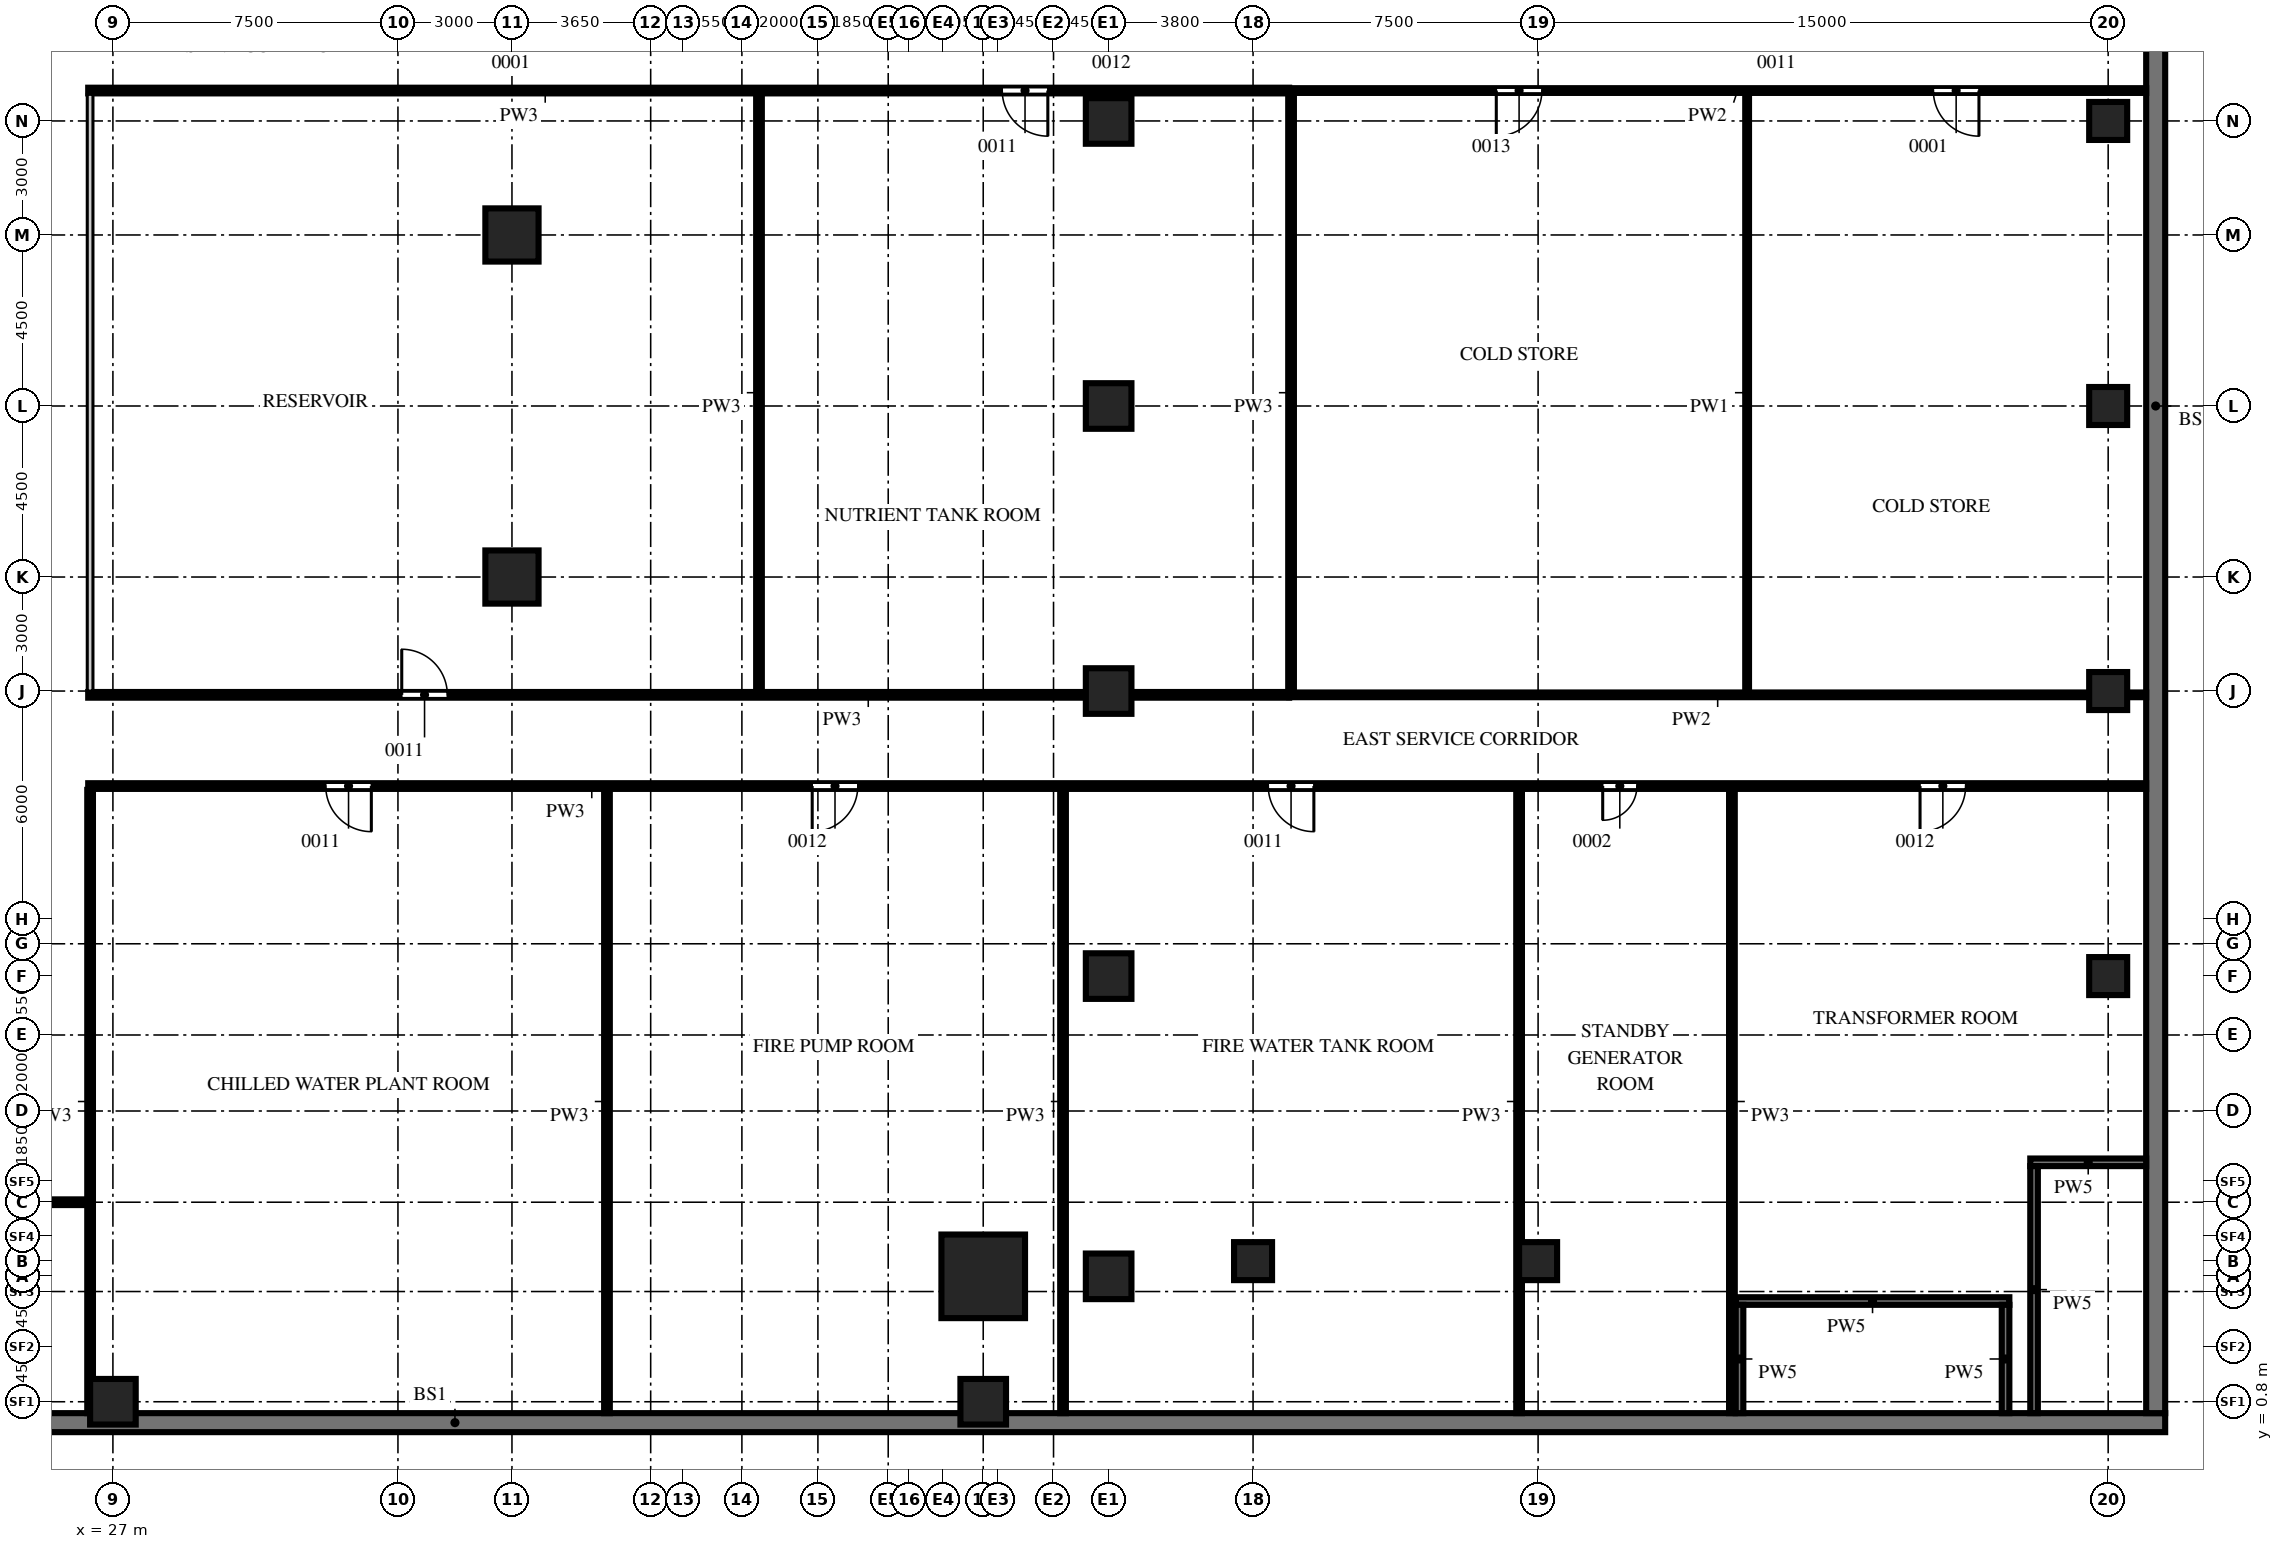
"""IFC4 building model, lengths in metres.
Left out: names, types, materials, properties, quantities, classifications, styles, units other than length and angle.
Written with IfcOpenShell. Run it as: python <this file> out.ifc"""

import sys

from ifc_helpers import new_model, si_unit, direction, frame, frame_2d, origin, origin_2d, place, context, subcontext, project, spatial, rectangle, extrude, source, transform, mapped, element, fill, save


model = new_model("IFC4")
c1 = context("Model", 3, precision=1e-05, world=origin(), true_north=direction((0.0, 1.0)))
c2 = subcontext(c1, "Body", "Model", "MODEL_VIEW")
j1 = project(units=[si_unit("LENGTHUNIT", "METRE"), si_unit("PLANEANGLEUNIT", "RADIAN")], contexts=[c1])
p1 = place(None, origin())
s1 = spatial("IfcSite", under=j1, at=p1, CompositionType="ELEMENT")
p2 = place(p1, origin())
s2 = spatial("IfcBuilding", under=s1, at=p2, CompositionType="ELEMENT")
p3 = place(p2, frame((0.0, 0.0, -9.0)))
s3 = spatial("IfcBuildingStorey", under=s2, at=p3, CompositionType="ELEMENT", Elevation=-9.0)
m1 = source(origin(), c2, "Body", "SweptSolid", [
    extrude(rectangle(XDim=90.0, YDim=0.5, at=frame_2d((45.0, 0.0))), origin(), (0.0, 0.0, 1.0), 4.2),
])
p4 = place(p3, frame((-9.0, 0.25, 0.0), z_axis=(0.0, 0.0, 1.0), x_axis=(1.0, 0.0, 0.0)))
e1 = element("IfcWall", 1, at=p4, inside=s3, PredefinedType="STANDARD", context=c2, shape_type="MappedRepresentation", body=[
    mapped(m1, transform((0.0, 0.0, 0.0))),
])
m2 = source(origin(), c2, "Body", "SweptSolid", [
    extrude(rectangle(XDim=53.0, YDim=0.5, at=frame_2d((26.5, 0.0))), origin(), (0.0, 0.0, 1.0), 4.2),
])
p5 = place(p3, frame((80.75, 0.5, 0.0), z_axis=(0.0, 0.0, 1.0), x_axis=(0.0, 1.0, 0.0)))
e2 = element("IfcWall", 2, at=p5, inside=s3, PredefinedType="STANDARD", context=c2, shape_type="MappedRepresentation", body=[
    mapped(m2, transform((0.0, 0.0, 0.0))),
])
m3 = source(origin(), c2, "Body", "SweptSolid", [
    extrude(rectangle(XDim=2.2, YDim=2.2, at=origin_2d()), origin(), (0.0, 0.0, 1.0), 4.5),
])
p6 = place(p3, frame((49.9, 4.1, 0.0), z_axis=(0.0, 0.0, 1.0), x_axis=(1.0, 0.0, 0.0)))
e3 = element("IfcColumn", 3, at=p6, inside=s3, PredefinedType="COLUMN", context=c2, shape_type="MappedRepresentation", body=[
    mapped(m3, transform((0.0, 0.0, 0.0))),
])
m4 = source(origin(), c2, "Body", "SweptSolid", [
    extrude(rectangle(XDim=1.2, YDim=1.2, at=origin_2d()), origin(), (0.0, 0.0, 1.0), 4.2),
])
for number, where, z_axis, x_axis in (
    (4, (27.0, 0.8, 0.0), (0.0, 0.0, 1.0), (1.0, 0.0, 0.0)),
    (5, (49.9, 0.8, 0.0), (0.0, 0.0, 1.0), (1.0, 0.0, 0.0)),
    (6, (53.2, 4.1, 0.0), (0.0, 0.0, 1.0), (1.0, 0.0, 0.0)),
    (7, (53.2, 12.0, 0.0), (0.0, 0.0, 1.0), (1.0, 0.0, 0.0)),
    (8, (53.2, 19.5, 0.0), (0.0, 0.0, 1.0), (1.0, 0.0, 0.0)),
    (9, (53.2, 27.0, 0.0), (0.0, 0.0, 1.0), (1.0, 0.0, 0.0)),
    (10, (53.2, 34.5, 0.0), (0.0, 0.0, 1.0), (1.0, 0.0, 0.0)),
):
    element("IfcColumn", number, at=place(p3, frame(where, z_axis=z_axis, x_axis=x_axis)), inside=s3, PredefinedType="COLUMN", context=c2, shape_type="MappedRepresentation", body=[
        mapped(m4, transform((0.0, 0.0, 0.0))),
    ])
m5 = source(origin(), c2, "Body", "SweptSolid", [
    extrude(rectangle(XDim=1.4, YDim=1.4, at=origin_2d()), origin(), (0.0, 0.0, 1.0), 4.2),
])
for number, where, z_axis, x_axis in (
    (11, (37.5, 22.5, 0.0), (0.0, 0.0, 1.0), (1.0, 0.0, 0.0)),
    (12, (37.5, 31.5, 0.0), (0.0, 0.0, 1.0), (1.0, 0.0, 0.0)),
):
    element("IfcColumn", number, at=place(p3, frame(where, z_axis=z_axis, x_axis=x_axis)), inside=s3, PredefinedType="COLUMN", context=c2, shape_type="MappedRepresentation", body=[
        mapped(m5, transform((0.0, 0.0, 0.0))),
    ])
m6 = source(origin(), c2, "Body", "SweptSolid", [
    extrude(rectangle(XDim=1.0, YDim=1.0, at=origin_2d()), origin(), (0.0, 0.0, 1.0), 4.2),
])
for number, where, z_axis, x_axis in (
    (13, (57.0, 4.5, 0.0), (0.0, 0.0, 1.0), (1.0, 0.0, 0.0)),
    (14, (64.5, 4.5, 0.0), (0.0, 0.0, 1.0), (1.0, 0.0, 0.0)),
    (15, (79.5, 12.0, 0.0), (0.0, 0.0, 1.0), (1.0, 0.0, 0.0)),
    (16, (79.5, 19.5, 0.0), (0.0, 0.0, 1.0), (1.0, 0.0, 0.0)),
    (17, (79.5, 27.0, 0.0), (0.0, 0.0, 1.0), (1.0, 0.0, 0.0)),
    (18, (79.5, 34.5, 0.0), (0.0, 0.0, 1.0), (1.0, 0.0, 0.0)),
):
    element("IfcColumn", number, at=place(p3, frame(where, z_axis=z_axis, x_axis=x_axis)), inside=s3, PredefinedType="COLUMN", context=c2, shape_type="MappedRepresentation", body=[
        mapped(m6, transform((0.0, 0.0, 0.0))),
    ])
m7 = source(origin(), c2, "Body", "SweptSolid", [
    extrude(rectangle(XDim=16.4, YDim=0.15, at=frame_2d((8.2, 0.0))), origin(), (0.0, 0.0, 1.0), 4.2),
])
for number, where, z_axis, x_axis in (
    (19, (26.4, 0.5, 0.0), (0.0, 0.0, 1.0), (0.0, 1.0, 0.0)),
    (20, (40.0, 0.5, 0.0), (0.0, 0.0, 1.0), (0.0, 1.0, 0.0)),
    (21, (52.0, 0.5, 0.0), (0.0, 0.0, 1.0), (0.0, 1.0, 0.0)),
    (22, (64.0, 0.5, 0.0), (0.0, 0.0, 1.0), (0.0, 1.0, 0.0)),
    (23, (69.6, 0.5, 0.0), (0.0, 0.0, 1.0), (0.0, 1.0, 0.0)),
):
    element("IfcWall", number, at=place(p3, frame(where, z_axis=z_axis, x_axis=x_axis)), inside=s3, PredefinedType="PARTITIONING", context=c2, shape_type="MappedRepresentation", body=[
        mapped(m7, transform((0.0, 0.0, 0.0))),
    ])
m8 = source(origin(), c2, "Body", "SweptSolid", [
    extrude(rectangle(XDim=22.0, YDim=0.15, at=frame_2d((11.0, 0.0))), origin(), (0.0, 0.0, 1.0), 4.2),
])
p7 = place(p3, frame((4.3, 6.05, 0.0), z_axis=(0.0, 0.0, 1.0), x_axis=(1.0, 0.0, 0.0)))
e24 = element("IfcWall", 24, at=p7, inside=s3, PredefinedType="PARTITIONING", context=c2, shape_type="MappedRepresentation", body=[
    mapped(m8, transform((0.0, 0.0, 0.0))),
])
m9 = source(origin(), c2, "Body", "SweptSolid", [
    extrude(rectangle(XDim=1.2, YDim=2.1, at=frame_2d((0.6, 1.05))), frame((0.0, 0.085, 0.0), z_axis=(0.0, -1.0, 0.0), x_axis=(1.0, 0.0, 0.0)), (0.0, 0.0, 1.0), 0.17),
])
p8 = place(p7, frame((9.05, 0.0, 0.0)))
e25 = element("IfcOpeningElement", 25, at=p8, cuts=e24, PredefinedType="OPENING", context=c2, shape_type="MappedRepresentation", body=[
    mapped(m9, transform((0.0, 0.0, 0.0))),
])
m10 = source(origin(), c2, "Body", "SweptSolid", [
    extrude(rectangle(XDim=54.15, YDim=0.15, at=frame_2d((27.075, 0.0))), origin(), (0.0, 0.0, 1.0), 4.2),
])
p9 = place(p3, frame((26.35, 17.0, 0.0), z_axis=(0.0, 0.0, 1.0), x_axis=(1.0, 0.0, 0.0)))
e26 = element("IfcWall", 26, at=p9, inside=s3, PredefinedType="PARTITIONING", context=c2, shape_type="MappedRepresentation", body=[
    mapped(m10, transform((0.0, 0.0, 0.0))),
])
p10 = place(p9, frame((6.25, 0.0, 0.0)))
e27 = element("IfcOpeningElement", 27, at=p10, cuts=e26, PredefinedType="OPENING", context=c2, shape_type="MappedRepresentation", body=[
    mapped(m9, transform((0.0, 0.0, 0.0))),
])
p11 = place(p9, frame((19.05, 0.0, 0.0)))
e28 = element("IfcOpeningElement", 28, at=p11, cuts=e26, PredefinedType="OPENING", context=c2, shape_type="MappedRepresentation", body=[
    mapped(m9, transform((0.0, 0.0, 0.0))),
])
p12 = place(p9, frame((31.05, 0.0, 0.0)))
e29 = element("IfcOpeningElement", 29, at=p12, cuts=e26, PredefinedType="OPENING", context=c2, shape_type="MappedRepresentation", body=[
    mapped(m9, transform((0.0, 0.0, 0.0))),
])
m11 = source(origin(), c2, "Body", "SweptSolid", [
    extrude(rectangle(XDim=0.9, YDim=2.1, at=frame_2d((0.45, 1.05))), frame((0.0, 0.085, 0.0), z_axis=(0.0, -1.0, 0.0), x_axis=(1.0, 0.0, 0.0)), (0.0, 0.0, 1.0), 0.17),
])
p13 = place(p9, frame((39.85, 0.0, 0.0)))
e30 = element("IfcOpeningElement", 30, at=p13, cuts=e26, PredefinedType="OPENING", context=c2, shape_type="MappedRepresentation", body=[
    mapped(m11, transform((0.0, 0.0, 0.0))),
])
p14 = place(p9, frame((48.2, 0.0, 0.0)))
e31 = element("IfcOpeningElement", 31, at=p14, cuts=e26, PredefinedType="OPENING", context=c2, shape_type="MappedRepresentation", body=[
    mapped(m9, transform((0.0, 0.0, 0.0))),
])
m12 = source(origin(), c2, "Body", "SweptSolid", [
    extrude(rectangle(XDim=31.6, YDim=0.15, at=frame_2d((15.8, 0.0))), origin(), (0.0, 0.0, 1.0), 4.2),
])
p15 = place(p3, frame((26.35, 19.4, 0.0), z_axis=(0.0, 0.0, 1.0), x_axis=(1.0, 0.0, 0.0)))
e32 = element("IfcWall", 32, at=p15, inside=s3, PredefinedType="PARTITIONING", context=c2, shape_type="MappedRepresentation", body=[
    mapped(m12, transform((0.0, 0.0, 0.0))),
])
p16 = place(p15, frame((8.25, 0.0, 0.0)))
e33 = element("IfcOpeningElement", 33, at=p16, cuts=e32, PredefinedType="OPENING", context=c2, shape_type="MappedRepresentation", body=[
    mapped(m9, transform((0.0, 0.0, 0.0))),
])
m13 = source(origin(), c2, "Body", "SweptSolid", [
    extrude(rectangle(XDim=22.55, YDim=0.125, at=frame_2d((11.275, 0.0))), origin(), (0.0, 0.0, 1.0), 4.2),
])
p17 = place(p3, frame((57.95, 19.4, 0.0), z_axis=(0.0, 0.0, 1.0), x_axis=(1.0, 0.0, 0.0)))
e34 = element("IfcWall", 34, at=p17, inside=s3, PredefinedType="PARTITIONING", context=c2, shape_type="MappedRepresentation", body=[
    mapped(m13, transform((0.0, 0.0, 0.0))),
])
m14 = source(origin(), c2, "Body", "SweptSolid", [
    extrude(rectangle(XDim=15.7, YDim=0.15, at=frame_2d((7.85, 0.0))), origin(), (0.0, 0.0, 1.0), 4.2),
])
for number, where, z_axis, x_axis in (
    (35, (26.4, 19.5, 0.0), (0.0, 0.0, 1.0), (0.0, 1.0, 0.0)),
    (36, (44.0, 19.5, 0.0), (0.0, 0.0, 1.0), (0.0, 1.0, 0.0)),
    (37, (58.0, 19.5, 0.0), (0.0, 0.0, 1.0), (0.0, 1.0, 0.0)),
):
    element("IfcWall", number, at=place(p3, frame(where, z_axis=z_axis, x_axis=x_axis)), inside=s3, PredefinedType="PARTITIONING", context=c2, shape_type="MappedRepresentation", body=[
        mapped(m14, transform((0.0, 0.0, 0.0))),
    ])
m15 = source(origin(), c2, "Body", "SweptSolid", [
    extrude(rectangle(XDim=15.7, YDim=0.1, at=frame_2d((7.85, 0.0))), origin(), (0.0, 0.0, 1.0), 4.2),
])
p18 = place(p3, frame((70.0, 19.5, 0.0), z_axis=(0.0, 0.0, 1.0), x_axis=(0.0, 1.0, 0.0)))
e38 = element("IfcWall", 38, at=p18, inside=s3, PredefinedType="PARTITIONING", context=c2, shape_type="MappedRepresentation", body=[
    mapped(m15, transform((0.0, 0.0, 0.0))),
])
p19 = place(p3, frame((26.35, 35.3, 0.0), z_axis=(0.0, 0.0, 1.0), x_axis=(1.0, 0.0, 0.0)))
e39 = element("IfcWall", 39, at=p19, inside=s3, PredefinedType="PARTITIONING", context=c2, shape_type="MappedRepresentation", body=[
    mapped(m12, transform((0.0, 0.0, 0.0))),
])
p20 = place(p19, frame((24.05, 0.0, 0.0)))
e40 = element("IfcOpeningElement", 40, at=p20, cuts=e39, PredefinedType="OPENING", context=c2, shape_type="MappedRepresentation", body=[
    mapped(m9, transform((0.0, 0.0, 0.0))),
])
p21 = place(p3, frame((57.95, 35.3, 0.0), z_axis=(0.0, 0.0, 1.0), x_axis=(1.0, 0.0, 0.0)))
e41 = element("IfcWall", 41, at=p21, inside=s3, PredefinedType="PARTITIONING", context=c2, shape_type="MappedRepresentation", body=[
    mapped(m13, transform((0.0, 0.0, 0.0))),
])
m16 = source(origin(), c2, "Body", "SweptSolid", [
    extrude(rectangle(XDim=1.2, YDim=2.1, at=frame_2d((0.6, 1.05))), frame((0.0, 0.073, 0.0), z_axis=(0.0, -1.0, 0.0), x_axis=(1.0, 0.0, 0.0)), (0.0, 0.0, 1.0), 0.145),
])
p22 = place(p21, frame((5.45, 0.0, 0.0)))
e42 = element("IfcOpeningElement", 42, at=p22, cuts=e41, PredefinedType="OPENING", context=c2, shape_type="MappedRepresentation", body=[
    mapped(m16, transform((0.0, 0.0, 0.0))),
])
p23 = place(p21, frame((16.95, 0.0, 0.0)))
e43 = element("IfcOpeningElement", 43, at=p23, cuts=e41, PredefinedType="OPENING", context=c2, shape_type="MappedRepresentation", body=[
    mapped(m16, transform((0.0, 0.0, 0.0))),
])
m17 = source(origin(), c2, "Body", "SweptSolid", [
    extrude(rectangle(XDim=7.2, YDim=0.2, at=frame_2d((3.6, 0.0))), origin(), (0.0, 0.0, 1.0), 4.2),
])
p24 = place(p3, frame((69.7, 3.45, 0.0), z_axis=(0.0, 0.0, 1.0), x_axis=(1.0, 0.0, 0.0)))
e44 = element("IfcWall", 44, at=p24, inside=s3, PredefinedType="PARTITIONING", context=c2, shape_type="MappedRepresentation", body=[
    mapped(m17, transform((0.0, 0.0, 0.0))),
])
m18 = source(origin(), c2, "Body", "SweptSolid", [
    extrude(rectangle(XDim=2.85, YDim=0.2, at=frame_2d((1.425, 0.0))), origin(), (0.0, 0.0, 1.0), 4.2),
])
for number, where, z_axis, x_axis in (
    (45, (69.8, 0.5, 0.0), (0.0, 0.0, 1.0), (0.0, 1.0, 0.0)),
    (46, (76.8, 0.5, 0.0), (0.0, 0.0, 1.0), (0.0, 1.0, 0.0)),
):
    element("IfcWall", number, at=place(p3, frame(where, z_axis=z_axis, x_axis=x_axis)), inside=s3, PredefinedType="PARTITIONING", context=c2, shape_type="MappedRepresentation", body=[
        mapped(m18, transform((0.0, 0.0, 0.0))),
    ])
m19 = source(origin(), c2, "Body", "SweptSolid", [
    extrude(rectangle(XDim=3.05, YDim=0.2, at=frame_2d((1.525, 0.0))), origin(), (0.0, 0.0, 1.0), 4.2),
])
p25 = place(p3, frame((77.45, 7.1, 0.0), z_axis=(0.0, 0.0, 1.0), x_axis=(1.0, 0.0, 0.0)))
e47 = element("IfcWall", 47, at=p25, inside=s3, PredefinedType="PARTITIONING", context=c2, shape_type="MappedRepresentation", body=[
    mapped(m19, transform((0.0, 0.0, 0.0))),
])
m20 = source(origin(), c2, "Body", "SweptSolid", [
    extrude(rectangle(XDim=6.5, YDim=0.2, at=frame_2d((3.25, 0.0))), origin(), (0.0, 0.0, 1.0), 4.2),
])
p26 = place(p3, frame((77.55, 0.5, 0.0), z_axis=(0.0, 0.0, 1.0), x_axis=(0.0, 1.0, 0.0)))
e48 = element("IfcWall", 48, at=p26, inside=s3, PredefinedType="PARTITIONING", context=c2, shape_type="MappedRepresentation", body=[
    mapped(m20, transform((0.0, 0.0, 0.0))),
])
m21 = source(origin(), c2, "Body", "SweptSolid", [
    extrude(rectangle(XDim=1.2, YDim=2.1, at=frame_2d((0.6, 1.05))), frame((0.0, 0.025, 0.0), z_axis=(0.0, -1.0, 0.0), x_axis=(1.0, 0.0, 0.0)), (0.0, 0.0, 1.0), 0.05),
])
p27 = place(p10, origin())
e49 = element("IfcDoor", 49, at=p27, inside=s3, OperationType="SINGLE_SWING_RIGHT", PredefinedType="DOOR", context=c2, shape_type="MappedRepresentation", body=[
    mapped(m21, transform((0.0, 0.0, 0.0))),
])
fill(e27, e49)
p28 = place(p11, origin())
e50 = element("IfcDoor", 50, at=p28, inside=s3, OperationType="SINGLE_SWING_LEFT", PredefinedType="DOOR", context=c2, shape_type="MappedRepresentation", body=[
    mapped(m21, transform((0.0, 0.0, 0.0))),
])
fill(e28, e50)
p29 = place(p12, origin())
e51 = element("IfcDoor", 51, at=p29, inside=s3, OperationType="SINGLE_SWING_RIGHT", PredefinedType="DOOR", context=c2, shape_type="MappedRepresentation", body=[
    mapped(m21, transform((0.0, 0.0, 0.0))),
])
fill(e29, e51)
m22 = source(origin(), c2, "Body", "SweptSolid", [
    extrude(rectangle(XDim=0.9, YDim=2.1, at=frame_2d((0.45, 1.05))), frame((0.0, 0.025, 0.0), z_axis=(0.0, -1.0, 0.0), x_axis=(1.0, 0.0, 0.0)), (0.0, 0.0, 1.0), 0.05),
])
p30 = place(p13, origin())
e52 = element("IfcDoor", 52, at=p30, inside=s3, OperationType="SINGLE_SWING_LEFT", PredefinedType="DOOR", context=c2, shape_type="MappedRepresentation", body=[
    mapped(m22, transform((0.0, 0.0, 0.0))),
])
fill(e30, e52)
p31 = place(p14, origin())
e53 = element("IfcDoor", 53, at=p31, inside=s3, OperationType="SINGLE_SWING_LEFT", PredefinedType="DOOR", context=c2, shape_type="MappedRepresentation", body=[
    mapped(m21, transform((0.0, 0.0, 0.0))),
])
fill(e31, e53)
p32 = place(p16, origin())
e54 = element("IfcDoor", 54, at=p32, inside=s3, OperationType="SINGLE_SWING_RIGHT", PredefinedType="DOOR", context=c2, shape_type="MappedRepresentation", body=[
    mapped(m21, transform((0.0, 0.0, 0.0))),
])
fill(e33, e54)
p33 = place(p20, origin())
e55 = element("IfcDoor", 55, at=p33, inside=s3, OperationType="SINGLE_SWING_RIGHT", PredefinedType="DOOR", context=c2, shape_type="MappedRepresentation", body=[
    mapped(m21, transform((0.0, 0.0, 0.0))),
])
fill(e40, e55)
p34 = place(p22, origin())
e56 = element("IfcDoor", 56, at=p34, inside=s3, OperationType="SINGLE_SWING_LEFT", PredefinedType="DOOR", context=c2, shape_type="MappedRepresentation", body=[
    mapped(m21, transform((0.0, 0.0, 0.0))),
])
fill(e42, e56)
p35 = place(p23, origin())
e57 = element("IfcDoor", 57, at=p35, inside=s3, OperationType="SINGLE_SWING_RIGHT", PredefinedType="DOOR", context=c2, shape_type="MappedRepresentation", body=[
    mapped(m21, transform((0.0, 0.0, 0.0))),
])
fill(e43, e57)
save(model, sys.argv[1])
